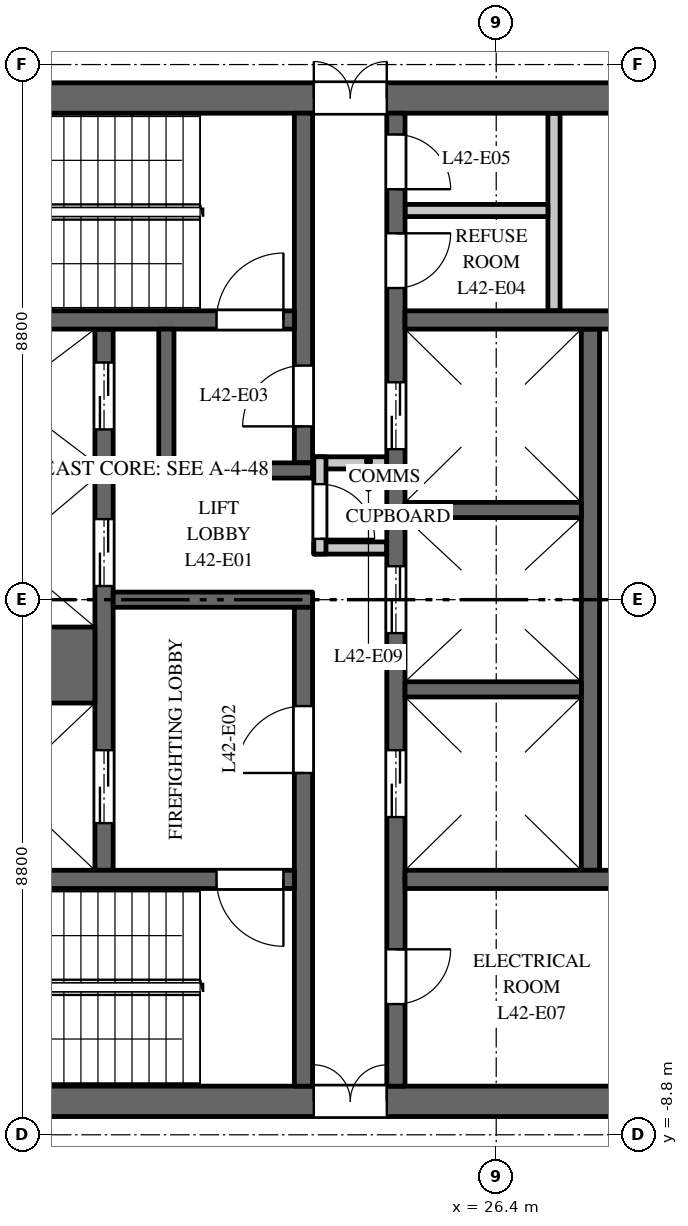
"""IFC4 building model, lengths in metres.
Left out: names, types, materials, properties, quantities, classifications, styles, units other than length and angle.
Written with IfcOpenShell. Run it as: python <this file> out.ifc"""

import sys

from ifc_helpers import new_model, si_unit, direction, frame, frame_2d, origin, place, context, subcontext, project, spatial, rectangle, extrude, element, fill, save


model = new_model("IFC4")
c1 = context("Model", 3, precision=1e-05, world=origin(), true_north=direction((0.0, 1.0)))
c2 = subcontext(c1, "Body", "Model", "MODEL_VIEW")
j1 = project(units=[si_unit("LENGTHUNIT", "METRE"), si_unit("PLANEANGLEUNIT", "RADIAN")], contexts=[c1])
p1 = place(None, origin())
s1 = spatial("IfcSite", under=j1, at=p1, CompositionType="ELEMENT")
p2 = place(p1, origin())
s2 = spatial("IfcBuilding", under=s1, at=p2, CompositionType="ELEMENT")
p3 = place(p2, frame((0.0, 0.0, 182.0)))
s3 = spatial("IfcBuildingStorey", under=s2, at=p3, CompositionType="ELEMENT", Elevation=182.0)
p4 = place(p3, frame((16.5, 8.25, 0.0), z_axis=(0.0, 0.0, 1.0), x_axis=(1.0, 0.0, 0.0)))
e1 = element("IfcWall", 1, at=p4, inside=s3, PredefinedType="SHEAR", context=c2, shape_type="SweptSolid", body=[
    extrude(rectangle(XDim=15.0, YDim=0.5, at=frame_2d((7.5, 0.0))), origin(), (0.0, 0.0, 1.0), 3.7),
])
p5 = place(p4, frame((6.9, 0.0, 0.0)))
e2 = element("IfcOpeningElement", 2, at=p5, cuts=e1, PredefinedType="OPENING", context=c2, shape_type="SweptSolid", body=[
    extrude(rectangle(XDim=1.2, YDim=2.1, at=frame_2d((0.6, 1.05))), frame((0.0, 0.26, 0.0), z_axis=(0.0, -1.0, 0.0), x_axis=(1.0, 0.0, 0.0)), (0.0, 0.0, 1.0), 0.52),
])
p6 = place(p4, frame((12.275, 0.0, 0.0)))
e3 = element("IfcOpeningElement", 3, at=p6, cuts=e1, PredefinedType="OPENING", context=c2, shape_type="SweptSolid", body=[
    extrude(rectangle(XDim=0.9, YDim=2.1, at=frame_2d((0.45, 1.05))), frame((0.0, 0.26, 0.0), z_axis=(0.0, -1.0, 0.0), x_axis=(1.0, 0.0, 0.0)), (0.0, 0.0, 1.0), 0.52),
])
p7 = place(p3, frame((16.5, -8.25, 0.0), z_axis=(0.0, 0.0, 1.0), x_axis=(1.0, 0.0, 0.0)))
e4 = element("IfcWall", 4, at=p7, inside=s3, PredefinedType="SHEAR", context=c2, shape_type="SweptSolid", body=[
    extrude(rectangle(XDim=15.0, YDim=0.5, at=frame_2d((7.5, 0.0))), origin(), (0.0, 0.0, 1.0), 3.7),
])
p8 = place(p7, frame((6.9, 0.0, 0.0)))
e5 = element("IfcOpeningElement", 5, at=p8, cuts=e4, PredefinedType="OPENING", context=c2, shape_type="SweptSolid", body=[
    extrude(rectangle(XDim=1.2, YDim=2.1, at=frame_2d((0.6, 1.05))), frame((0.0, 0.26, 0.0), z_axis=(0.0, -1.0, 0.0), x_axis=(1.0, 0.0, 0.0)), (0.0, 0.0, 1.0), 0.52),
])
p9 = place(p7, frame((12.95, 0.0, 0.0)))
e6 = element("IfcOpeningElement", 6, at=p9, cuts=e4, PredefinedType="OPENING", context=c2, shape_type="SweptSolid", body=[
    extrude(rectangle(XDim=0.9, YDim=2.1, at=frame_2d((0.45, 1.05))), frame((0.0, 0.26, 0.0), z_axis=(0.0, -1.0, 0.0), x_axis=(1.0, 0.0, 0.0)), (0.0, 0.0, 1.0), 0.52),
])
p10 = place(p3, frame((27.95, -4.45, 0.0), z_axis=(0.0, 0.0, 1.0), x_axis=(0.0, 1.0, 0.0)))
e7 = element("IfcWall", 7, at=p10, inside=s3, PredefinedType="SHEAR", context=c2, shape_type="SweptSolid", body=[
    extrude(rectangle(XDim=8.9, YDim=0.3, at=frame_2d((4.45, 0.0))), origin(), (0.0, 0.0, 1.0), 3.7),
])
p11 = place(p3, frame((19.95, -4.45, 0.0), z_axis=(0.0, 0.0, 1.0), x_axis=(0.0, 1.0, 0.0)))
e8 = element("IfcWall", 8, at=p11, inside=s3, PredefinedType="SHEAR", context=c2, shape_type="SweptSolid", body=[
    extrude(rectangle(XDim=8.9, YDim=0.3, at=frame_2d((4.45, 0.0))), origin(), (0.0, 0.0, 1.0), 3.7),
])
p12 = place(p11, frame((0.775, 0.0, 0.0)))
e9 = element("IfcOpeningElement", 9, at=p12, cuts=e8, PredefinedType="OPENING", context=c2, shape_type="SweptSolid", body=[
    extrude(rectangle(XDim=1.2, YDim=2.1, at=frame_2d((0.6, 1.05))), frame((0.0, 0.16, 0.0), z_axis=(0.0, -1.0, 0.0), x_axis=(1.0, 0.0, 0.0)), (0.0, 0.0, 1.0), 0.32),
])
p13 = place(p11, frame((4.675, 0.0, 0.0)))
e10 = element("IfcOpeningElement", 10, at=p13, cuts=e8, PredefinedType="OPENING", context=c2, shape_type="SweptSolid", body=[
    extrude(rectangle(XDim=1.1, YDim=2.1, at=frame_2d((0.55, 1.05))), frame((0.0, 0.16, 0.0), z_axis=(0.0, -1.0, 0.0), x_axis=(1.0, 0.0, 0.0)), (0.0, 0.0, 1.0), 0.32),
])
p14 = place(p11, frame((7.25, 0.0, 0.0)))
e11 = element("IfcOpeningElement", 11, at=p14, cuts=e8, PredefinedType="OPENING", context=c2, shape_type="SweptSolid", body=[
    extrude(rectangle(XDim=1.1, YDim=2.1, at=frame_2d((0.55, 1.05))), frame((0.0, 0.16, 0.0), z_axis=(0.0, -1.0, 0.0), x_axis=(1.0, 0.0, 0.0)), (0.0, 0.0, 1.0), 0.32),
])
p15 = place(p3, frame((24.75, -8.0, 0.0), z_axis=(0.0, 0.0, 1.0), x_axis=(0.0, 1.0, 0.0)))
e12 = element("IfcWall", 12, at=p15, inside=s3, PredefinedType="SHEAR", context=c2, shape_type="SweptSolid", body=[
    extrude(rectangle(XDim=16.0, YDim=0.3, at=frame_2d((8.0, 0.0))), origin(), (0.0, 0.0, 1.0), 3.7),
])
p16 = place(p15, frame((4.425, 0.0, 0.0)))
e13 = element("IfcOpeningElement", 13, at=p16, cuts=e12, PredefinedType="OPENING", context=c2, shape_type="SweptSolid", body=[
    extrude(rectangle(XDim=1.1, YDim=2.1, at=frame_2d((0.55, 1.05))), frame((0.0, 0.16, 0.0), z_axis=(0.0, -1.0, 0.0), x_axis=(1.0, 0.0, 0.0)), (0.0, 0.0, 1.0), 0.32),
])
p17 = place(p15, frame((7.45, 0.0, 0.0)))
e14 = element("IfcOpeningElement", 14, at=p17, cuts=e12, PredefinedType="OPENING", context=c2, shape_type="SweptSolid", body=[
    extrude(rectangle(XDim=1.1, YDim=2.1, at=frame_2d((0.55, 1.05))), frame((0.0, 0.16, 0.0), z_axis=(0.0, -1.0, 0.0), x_axis=(1.0, 0.0, 0.0)), (0.0, 0.0, 1.0), 0.32),
])
p18 = place(p15, frame((10.475, 0.0, 0.0)))
e15 = element("IfcOpeningElement", 15, at=p18, cuts=e12, PredefinedType="OPENING", context=c2, shape_type="SweptSolid", body=[
    extrude(rectangle(XDim=1.1, YDim=2.1, at=frame_2d((0.55, 1.05))), frame((0.0, 0.16, 0.0), z_axis=(0.0, -1.0, 0.0), x_axis=(1.0, 0.0, 0.0)), (0.0, 0.0, 1.0), 0.32),
])
p19 = place(p15, frame((13.125, 0.0, 0.0)))
e16 = element("IfcOpeningElement", 16, at=p19, cuts=e12, PredefinedType="OPENING", context=c2, shape_type="SweptSolid", body=[
    extrude(rectangle(XDim=0.9, YDim=2.1, at=frame_2d((0.45, 1.05))), frame((0.0, 0.16, 0.0), z_axis=(0.0, -1.0, 0.0), x_axis=(1.0, 0.0, 0.0)), (0.0, 0.0, 1.0), 0.32),
])
p20 = place(p15, frame((14.75, 0.0, 0.0)))
e17 = element("IfcOpeningElement", 17, at=p20, cuts=e12, PredefinedType="OPENING", context=c2, shape_type="SweptSolid", body=[
    extrude(rectangle(XDim=0.9, YDim=2.1, at=frame_2d((0.45, 1.05))), frame((0.0, 0.16, 0.0), z_axis=(0.0, -1.0, 0.0), x_axis=(1.0, 0.0, 0.0)), (0.0, 0.0, 1.0), 0.32),
])
p21 = place(p15, frame((1.35, 0.0, 0.0)))
e18 = element("IfcOpeningElement", 18, at=p21, cuts=e12, PredefinedType="OPENING", context=c2, shape_type="SweptSolid", body=[
    extrude(rectangle(XDim=0.9, YDim=2.1, at=frame_2d((0.45, 1.05))), frame((0.0, 0.16, 0.0), z_axis=(0.0, -1.0, 0.0), x_axis=(1.0, 0.0, 0.0)), (0.0, 0.0, 1.0), 0.32),
])
p22 = place(p3, frame((20.1, 0.0, 0.0), z_axis=(0.0, 0.0, 1.0), x_axis=(1.0, 0.0, 0.0)))
e19 = element("IfcWall", 19, at=p22, inside=s3, PredefinedType="SHEAR", context=c2, shape_type="SweptSolid", body=[
    extrude(rectangle(XDim=3.28, YDim=0.25, at=frame_2d((1.64, 0.0))), origin(), (0.0, 0.0, 1.0), 3.7),
])
for number, where, z_axis, x_axis in (
    (20, (23.4, 0.85, 0.0), (0.0, 0.0, 1.0), (1.0, 0.0, 0.0)),
    (21, (23.4, 2.25, 0.0), (0.0, 0.0, 1.0), (1.0, 0.0, 0.0)),
):
    element("IfcWall", number, at=place(p3, frame(where, z_axis=z_axis, x_axis=x_axis)), inside=s3, PredefinedType="PARTITIONING", context=c2, shape_type="SweptSolid", body=[
        extrude(rectangle(XDim=1.2, YDim=0.2, at=frame_2d((0.6, 0.0))), origin(), (0.0, 0.0, 1.0), 3.7),
    ])
p23 = place(p3, frame((23.5, 0.75, 0.0), z_axis=(0.0, 0.0, 1.0), x_axis=(0.0, 1.0, 0.0)))
e22 = element("IfcWall", 22, at=p23, inside=s3, PredefinedType="PARTITIONING", context=c2, shape_type="SweptSolid", body=[
    extrude(rectangle(XDim=1.6, YDim=0.2, at=frame_2d((0.8, 0.0))), origin(), (0.0, 0.0, 1.0), 3.7),
])
p24 = place(p23, frame((0.25, 0.0, 0.0)))
e23 = element("IfcOpeningElement", 23, at=p24, cuts=e22, PredefinedType="OPENING", context=c2, shape_type="SweptSolid", body=[
    extrude(rectangle(XDim=0.9, YDim=2.1, at=frame_2d((0.45, 1.05))), frame((0.0, 0.11, 0.0), z_axis=(0.0, -1.0, 0.0), x_axis=(1.0, 0.0, 0.0)), (0.0, 0.0, 1.0), 0.22),
])
p25 = place(p3, frame((24.9, 4.6, 0.0), z_axis=(0.0, 0.0, 1.0), x_axis=(1.0, 0.0, 0.0)))
e24 = element("IfcWall", 24, at=p25, inside=s3, PredefinedType="SHEAR", context=c2, shape_type="SweptSolid", body=[
    extrude(rectangle(XDim=6.1, YDim=0.3, at=frame_2d((3.05, 0.0))), origin(), (0.0, 0.0, 1.0), 3.7),
])
p26 = place(p25, frame((4.2, 0.0, 0.0)))
e25 = element("IfcOpeningElement", 25, at=p26, cuts=e24, PredefinedType="OPENING", context=c2, shape_type="SweptSolid", body=[
    extrude(rectangle(XDim=0.9, YDim=2.1, at=frame_2d((0.45, 1.05))), frame((0.0, 0.16, 0.0), z_axis=(0.0, -1.0, 0.0), x_axis=(1.0, 0.0, 0.0)), (0.0, 0.0, 1.0), 0.32),
])
p27 = place(p3, frame((27.35, 4.75, 0.0), z_axis=(0.0, 0.0, 1.0), x_axis=(0.0, 1.0, 0.0)))
e26 = element("IfcWall", 26, at=p27, inside=s3, PredefinedType="PARTITIONING", context=c2, shape_type="SweptSolid", body=[
    extrude(rectangle(XDim=3.25, YDim=0.2, at=frame_2d((1.625, 0.0))), origin(), (0.0, 0.0, 1.0), 3.7),
])
p28 = place(p3, frame((24.9, 6.4, 0.0), z_axis=(0.0, 0.0, 1.0), x_axis=(1.0, 0.0, 0.0)))
e27 = element("IfcWall", 27, at=p28, inside=s3, PredefinedType="PARTITIONING", context=c2, shape_type="SweptSolid", body=[
    extrude(rectangle(XDim=2.35, YDim=0.2, at=frame_2d((1.175, 0.0))), origin(), (0.0, 0.0, 1.0), 3.7),
])
p29 = place(p3, frame((24.9, -4.6, 0.0), z_axis=(0.0, 0.0, 1.0), x_axis=(1.0, 0.0, 0.0)))
e28 = element("IfcWall", 28, at=p29, inside=s3, PredefinedType="SHEAR", context=c2, shape_type="SweptSolid", body=[
    extrude(rectangle(XDim=6.1, YDim=0.3, at=frame_2d((3.05, 0.0))), origin(), (0.0, 0.0, 1.0), 3.7),
])
p30 = place(p3, frame((16.9, -1.075, 0.0), z_axis=(0.0, 0.0, 1.0), x_axis=(1.0, 0.0, 0.0)))
e29 = element("IfcWall", 29, at=p30, inside=s3, PredefinedType="SHEAR", context=c2, shape_type="SweptSolid", body=[
    extrude(rectangle(XDim=2.9, YDim=1.25, at=frame_2d((1.45, 0.0))), origin(), (0.0, 0.0, 1.0), 3.7),
])
for number, where, z_axis, x_axis in (
    (30, (16.9, 2.125, 0.0), (0.0, 0.0, 1.0), (1.0, 0.0, 0.0)),
    (31, (24.9, -1.475, 0.0), (0.0, 0.0, 1.0), (1.0, 0.0, 0.0)),
    (32, (24.9, 1.475, 0.0), (0.0, 0.0, 1.0), (1.0, 0.0, 0.0)),
):
    element("IfcWall", number, at=place(p3, frame(where, z_axis=z_axis, x_axis=x_axis)), inside=s3, PredefinedType="SHEAR", context=c2, shape_type="SweptSolid", body=[
        extrude(rectangle(XDim=2.9, YDim=0.25, at=frame_2d((1.45, 0.0))), origin(), (0.0, 0.0, 1.0), 3.7),
    ])
p31 = place(p3, frame((23.23, 2.25, 0.0), z_axis=(0.0, 0.0, 1.0), x_axis=(0.0, 1.0, 0.0)))
e33 = element("IfcWall", 33, at=p31, inside=s3, PredefinedType="SHEAR", context=c2, shape_type="SweptSolid", body=[
    extrude(rectangle(XDim=5.75, YDim=0.3, at=frame_2d((2.875, 0.0))), origin(), (0.0, 0.0, 1.0), 3.7),
])
p32 = place(p31, frame((0.6, 0.0, 0.0)))
e34 = element("IfcOpeningElement", 34, at=p32, cuts=e33, PredefinedType="OPENING", context=c2, shape_type="SweptSolid", body=[
    extrude(rectangle(XDim=1.0, YDim=2.1, at=frame_2d((0.5, 1.05))), frame((0.0, 0.16, 0.0), z_axis=(0.0, -1.0, 0.0), x_axis=(1.0, 0.0, 0.0)), (0.0, 0.0, 1.0), 0.32),
])
p33 = place(p3, frame((23.23, -8.0, 0.0), z_axis=(0.0, 0.0, 1.0), x_axis=(0.0, 1.0, 0.0)))
e35 = element("IfcWall", 35, at=p33, inside=s3, PredefinedType="SHEAR", context=c2, shape_type="SweptSolid", body=[
    extrude(rectangle(XDim=7.875, YDim=0.3, at=frame_2d((3.938, 0.0))), origin(), (0.0, 0.0, 1.0), 3.7),
])
p34 = place(p33, frame((5.15, 0.0, 0.0)))
e36 = element("IfcOpeningElement", 36, at=p34, cuts=e35, PredefinedType="OPENING", context=c2, shape_type="SweptSolid", body=[
    extrude(rectangle(XDim=1.1, YDim=2.1, at=frame_2d((0.55, 1.05))), frame((0.0, 0.16, 0.0), z_axis=(0.0, -1.0, 0.0), x_axis=(1.0, 0.0, 0.0)), (0.0, 0.0, 1.0), 0.32),
])
p35 = place(p3, frame((16.9, 4.6, 0.0), z_axis=(0.0, 0.0, 1.0), x_axis=(1.0, 0.0, 0.0)))
e37 = element("IfcWall", 37, at=p35, inside=s3, PredefinedType="SHEAR", context=c2, shape_type="SweptSolid", body=[
    extrude(rectangle(XDim=6.18, YDim=0.3, at=frame_2d((3.09, 0.0))), origin(), (0.0, 0.0, 1.0), 3.7),
])
p36 = place(p35, frame((4.9, 0.0, 0.0)))
e38 = element("IfcOpeningElement", 38, at=p36, cuts=e37, PredefinedType="OPENING", context=c2, shape_type="SweptSolid", body=[
    extrude(rectangle(XDim=1.1, YDim=2.1, at=frame_2d((0.55, 1.05))), frame((0.0, 0.16, 0.0), z_axis=(0.0, -1.0, 0.0), x_axis=(1.0, 0.0, 0.0)), (0.0, 0.0, 1.0), 0.32),
])
p37 = place(p3, frame((16.9, -4.6, 0.0), z_axis=(0.0, 0.0, 1.0), x_axis=(1.0, 0.0, 0.0)))
e39 = element("IfcWall", 39, at=p37, inside=s3, PredefinedType="SHEAR", context=c2, shape_type="SweptSolid", body=[
    extrude(rectangle(XDim=6.18, YDim=0.3, at=frame_2d((3.09, 0.0))), origin(), (0.0, 0.0, 1.0), 3.7),
])
p38 = place(p37, frame((4.9, 0.0, 0.0)))
e40 = element("IfcOpeningElement", 40, at=p38, cuts=e39, PredefinedType="OPENING", context=c2, shape_type="SweptSolid", body=[
    extrude(rectangle(XDim=1.1, YDim=2.1, at=frame_2d((0.55, 1.05))), frame((0.0, 0.16, 0.0), z_axis=(0.0, -1.0, 0.0), x_axis=(1.0, 0.0, 0.0)), (0.0, 0.0, 1.0), 0.32),
])
p39 = place(p3, frame((20.85, 2.125, 0.0), z_axis=(0.0, 0.0, 1.0), x_axis=(1.0, 0.0, 0.0)))
e41 = element("IfcWall", 41, at=p39, inside=s3, PredefinedType="SHEAR", context=c2, shape_type="SweptSolid", body=[
    extrude(rectangle(XDim=2.53, YDim=0.25, at=frame_2d((1.265, 0.0))), origin(), (0.0, 0.0, 1.0), 3.7),
])
p40 = place(p3, frame((20.975, 2.25, 0.0), z_axis=(0.0, 0.0, 1.0), x_axis=(0.0, 1.0, 0.0)))
e42 = element("IfcWall", 42, at=p40, inside=s3, PredefinedType="SHEAR", context=c2, shape_type="SweptSolid", body=[
    extrude(rectangle(XDim=2.2, YDim=0.25, at=frame_2d((1.1, 0.0))), origin(), (0.0, 0.0, 1.0), 3.7),
])
p41 = place(p3, frame((7.283, 8.464, 0.0), z_axis=(0.0, 0.0, 1.0), x_axis=(0.925447652154, 0.378875498182, 0.0)))
e43 = element("IfcWall", 43, at=p41, inside=s3, PredefinedType="PARTITIONING", context=c2, shape_type="SweptSolid", body=[
    extrude(rectangle(XDim=13.711, YDim=0.1, at=frame_2d((6.855, 0.0))), origin(), (0.0, 0.0, 1.0), 3.7),
])
p42 = place(p3, frame((14.317, -8.236, 0.0), z_axis=(0.0, 0.0, 1.0), x_axis=(0.542334368531, -0.840162741801, 0.0)))
e44 = element("IfcWall", 44, at=p42, inside=s3, PredefinedType="PARTITIONING", context=c2, shape_type="SweptSolid", body=[
    extrude(rectangle(XDim=15.837, YDim=0.1, at=frame_2d((7.919, 0.0))), origin(), (0.0, 0.0, 1.0), 3.7),
])
p43 = place(p12, origin())
e45 = element("IfcDoor", 45, at=p43, inside=s3, OperationType="DOUBLE_DOOR_SLIDING", PredefinedType="DOOR", context=c2, shape_type="SweptSolid", body=[
    extrude(rectangle(XDim=1.2, YDim=2.1, at=frame_2d((0.6, 1.05))), frame((0.0, 0.025, 0.0), z_axis=(0.0, -1.0, 0.0), x_axis=(1.0, 0.0, 0.0)), (0.0, 0.0, 1.0), 0.05),
])
fill(e9, e45)
p44 = place(p13, origin())
e46 = element("IfcDoor", 46, at=p44, inside=s3, OperationType="DOUBLE_DOOR_SLIDING", PredefinedType="DOOR", context=c2, shape_type="SweptSolid", body=[
    extrude(rectangle(XDim=1.1, YDim=2.1, at=frame_2d((0.55, 1.05))), frame((0.0, 0.025, 0.0), z_axis=(0.0, -1.0, 0.0), x_axis=(1.0, 0.0, 0.0)), (0.0, 0.0, 1.0), 0.05),
])
fill(e10, e46)
p45 = place(p14, origin())
e47 = element("IfcDoor", 47, at=p45, inside=s3, OperationType="DOUBLE_DOOR_SLIDING", PredefinedType="DOOR", context=c2, shape_type="SweptSolid", body=[
    extrude(rectangle(XDim=1.1, YDim=2.1, at=frame_2d((0.55, 1.05))), frame((0.0, 0.025, 0.0), z_axis=(0.0, -1.0, 0.0), x_axis=(1.0, 0.0, 0.0)), (0.0, 0.0, 1.0), 0.05),
])
fill(e11, e47)
p46 = place(p16, origin())
e48 = element("IfcDoor", 48, at=p46, inside=s3, OperationType="DOUBLE_DOOR_SLIDING", PredefinedType="DOOR", context=c2, shape_type="SweptSolid", body=[
    extrude(rectangle(XDim=1.1, YDim=2.1, at=frame_2d((0.55, 1.05))), frame((0.0, 0.025, 0.0), z_axis=(0.0, -1.0, 0.0), x_axis=(1.0, 0.0, 0.0)), (0.0, 0.0, 1.0), 0.05),
])
fill(e13, e48)
p47 = place(p17, origin())
e49 = element("IfcDoor", 49, at=p47, inside=s3, OperationType="DOUBLE_DOOR_SLIDING", PredefinedType="DOOR", context=c2, shape_type="SweptSolid", body=[
    extrude(rectangle(XDim=1.1, YDim=2.1, at=frame_2d((0.55, 1.05))), frame((0.0, 0.025, 0.0), z_axis=(0.0, -1.0, 0.0), x_axis=(1.0, 0.0, 0.0)), (0.0, 0.0, 1.0), 0.05),
])
fill(e14, e49)
p48 = place(p18, origin())
e50 = element("IfcDoor", 50, at=p48, inside=s3, OperationType="DOUBLE_DOOR_SLIDING", PredefinedType="DOOR", context=c2, shape_type="SweptSolid", body=[
    extrude(rectangle(XDim=1.1, YDim=2.1, at=frame_2d((0.55, 1.05))), frame((0.0, 0.025, 0.0), z_axis=(0.0, -1.0, 0.0), x_axis=(1.0, 0.0, 0.0)), (0.0, 0.0, 1.0), 0.05),
])
fill(e15, e50)
p49 = place(p36, origin())
e51 = element("IfcDoor", 51, at=p49, inside=s3, OperationType="SINGLE_SWING_LEFT", PredefinedType="DOOR", context=c2, shape_type="SweptSolid", body=[
    extrude(rectangle(XDim=1.1, YDim=2.1, at=frame_2d((0.55, 1.05))), frame((0.0, 0.025, 0.0), z_axis=(0.0, -1.0, 0.0), x_axis=(1.0, 0.0, 0.0)), (0.0, 0.0, 1.0), 0.05),
])
fill(e38, e51)
p50 = place(p38, origin())
e52 = element("IfcDoor", 52, at=p50, inside=s3, OperationType="SINGLE_SWING_RIGHT", PredefinedType="DOOR", context=c2, shape_type="SweptSolid", body=[
    extrude(rectangle(XDim=1.1, YDim=2.1, at=frame_2d((0.55, 1.05))), frame((0.0, 0.025, 0.0), z_axis=(0.0, -1.0, 0.0), x_axis=(1.0, 0.0, 0.0)), (0.0, 0.0, 1.0), 0.05),
])
fill(e40, e52)
p51 = place(p34, origin())
e53 = element("IfcDoor", 53, at=p51, inside=s3, OperationType="SINGLE_SWING_RIGHT", PredefinedType="DOOR", context=c2, shape_type="SweptSolid", body=[
    extrude(rectangle(XDim=1.1, YDim=2.1, at=frame_2d((0.55, 1.05))), frame((0.0, 0.025, 0.0), z_axis=(0.0, -1.0, 0.0), x_axis=(1.0, 0.0, 0.0)), (0.0, 0.0, 1.0), 0.05),
])
fill(e36, e53)
p52 = place(p32, origin())
e54 = element("IfcDoor", 54, at=p52, inside=s3, OperationType="SINGLE_SWING_RIGHT", PredefinedType="DOOR", context=c2, shape_type="SweptSolid", body=[
    extrude(rectangle(XDim=1.0, YDim=2.1, at=frame_2d((0.5, 1.05))), frame((0.0, 0.025, 0.0), z_axis=(0.0, -1.0, 0.0), x_axis=(1.0, 0.0, 0.0)), (0.0, 0.0, 1.0), 0.05),
])
fill(e34, e54)
p53 = place(p5, origin())
e55 = element("IfcDoor", 55, at=p53, inside=s3, OperationType="DOUBLE_DOOR_DOUBLE_SWING", PredefinedType="DOOR", context=c2, shape_type="SweptSolid", body=[
    extrude(rectangle(XDim=1.2, YDim=2.1, at=frame_2d((0.6, 1.05))), frame((0.0, 0.025, 0.0), z_axis=(0.0, -1.0, 0.0), x_axis=(1.0, 0.0, 0.0)), (0.0, 0.0, 1.0), 0.05),
])
fill(e2, e55)
p54 = place(p8, origin())
e56 = element("IfcDoor", 56, at=p54, inside=s3, OperationType="DOUBLE_DOOR_DOUBLE_SWING", PredefinedType="DOOR", context=c2, shape_type="SweptSolid", body=[
    extrude(rectangle(XDim=1.2, YDim=2.1, at=frame_2d((0.6, 1.05))), frame((0.0, 0.025, 0.0), z_axis=(0.0, -1.0, 0.0), x_axis=(1.0, 0.0, 0.0)), (0.0, 0.0, 1.0), 0.05),
])
fill(e5, e56)
p55 = place(p19, origin())
e57 = element("IfcDoor", 57, at=p55, inside=s3, OperationType="SINGLE_SWING_RIGHT", PredefinedType="DOOR", context=c2, shape_type="SweptSolid", body=[
    extrude(rectangle(XDim=0.9, YDim=2.1, at=frame_2d((0.45, 1.05))), frame((0.0, 0.025, 0.0), z_axis=(0.0, -1.0, 0.0), x_axis=(1.0, 0.0, 0.0)), (0.0, 0.0, 1.0), 0.05),
])
fill(e16, e57)
p56 = place(p20, origin())
e58 = element("IfcDoor", 58, at=p56, inside=s3, OperationType="SINGLE_SWING_LEFT", PredefinedType="DOOR", context=c2, shape_type="SweptSolid", body=[
    extrude(rectangle(XDim=0.9, YDim=2.1, at=frame_2d((0.45, 1.05))), frame((0.0, 0.025, 0.0), z_axis=(0.0, -1.0, 0.0), x_axis=(1.0, 0.0, 0.0)), (0.0, 0.0, 1.0), 0.05),
])
fill(e17, e58)
p57 = place(p21, origin())
e59 = element("IfcDoor", 59, at=p57, inside=s3, OperationType="SINGLE_SWING_RIGHT", PredefinedType="DOOR", context=c2, shape_type="SweptSolid", body=[
    extrude(rectangle(XDim=0.9, YDim=2.1, at=frame_2d((0.45, 1.05))), frame((0.0, 0.025, 0.0), z_axis=(0.0, -1.0, 0.0), x_axis=(1.0, 0.0, 0.0)), (0.0, 0.0, 1.0), 0.05),
])
fill(e18, e59)
p58 = place(p24, origin())
e60 = element("IfcDoor", 60, at=p58, inside=s3, OperationType="SINGLE_SWING_LEFT", PredefinedType="DOOR", context=c2, shape_type="SweptSolid", body=[
    extrude(rectangle(XDim=0.9, YDim=2.1, at=frame_2d((0.45, 1.05))), frame((0.0, 0.025, 0.0), z_axis=(0.0, -1.0, 0.0), x_axis=(1.0, 0.0, 0.0)), (0.0, 0.0, 1.0), 0.05),
])
fill(e23, e60)
save(model, sys.argv[1])
